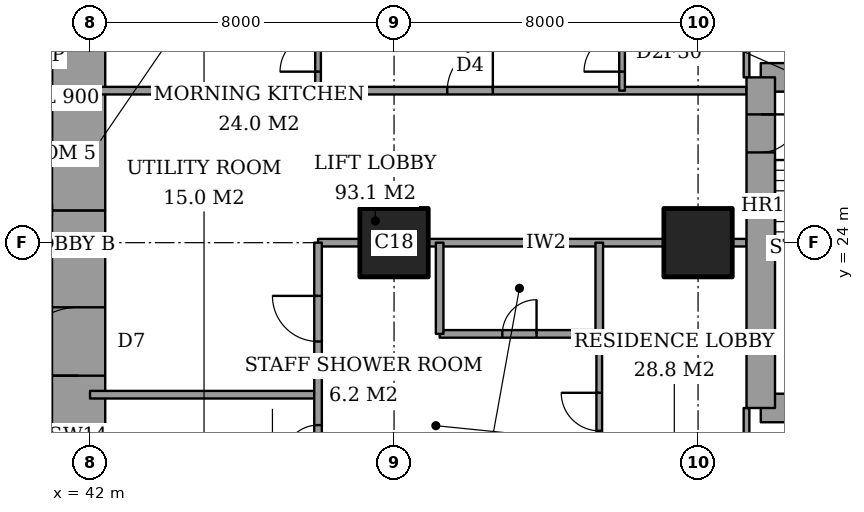
"""IFC4 building model, lengths in metres.
Left out: names, types, materials, properties, quantities, classifications, styles, units other than length and angle.
Written with IfcOpenShell. Run it as: python <this file> out.ifc"""

import sys

from ifc_helpers import new_model, si_unit, direction, frame, frame_2d, origin, origin_2d, place, context, subcontext, project, spatial, rectangle, extrude, element, fill, save


model = new_model("IFC4")
c1 = context("Model", 3, precision=1e-05, world=origin(), true_north=direction((0.0, 1.0)))
c2 = subcontext(c1, "Body", "Model", "MODEL_VIEW")
j1 = project(units=[si_unit("LENGTHUNIT", "METRE"), si_unit("PLANEANGLEUNIT", "RADIAN")], contexts=[c1])
p1 = place(None, origin())
s1 = spatial("IfcSite", under=j1, at=p1, CompositionType="ELEMENT")
p2 = place(p1, origin())
s2 = spatial("IfcBuilding", under=s1, at=p2, CompositionType="ELEMENT")
p3 = place(p2, frame((0.0, 0.0, 214.6)))
s3 = spatial("IfcBuildingStorey", under=s2, at=p3, CompositionType="ELEMENT", Elevation=214.6)
for number, where, z_axis, x_axis in (
    (1, (50.0, 24.0, 0.0), (0.0, 0.0, 1.0), (1.0, 0.0, 0.0)),
    (2, (58.0, 24.0, 0.0), (0.0, 0.0, 1.0), (1.0, 0.0, 0.0)),
):
    element("IfcColumn", number, at=place(p3, frame(where, z_axis=z_axis, x_axis=x_axis)), inside=s3, PredefinedType="COLUMN", context=c2, shape_type="SweptSolid", body=[
        extrude(rectangle(XDim=1.8, YDim=1.8, at=origin_2d()), origin(), (0.0, 0.0, 1.0), 3.6),
    ])
p4 = place(p3, frame((41.7, 13.0, 0.0), z_axis=(0.0, 0.0, 1.0), x_axis=(0.0, 1.0, 0.0)))
e3 = element("IfcWall", 3, at=p4, inside=s3, PredefinedType="SHEAR", context=c2, shape_type="SweptSolid", body=[
    extrude(rectangle(XDim=11.85, YDim=1.4, at=frame_2d((5.925, 0.0))), origin(), (0.0, 0.0, 1.0), 3.6),
])
p5 = place(p4, frame((7.5, 0.0, 0.0)))
e4 = element("IfcOpeningElement", 4, at=p5, cuts=e3, PredefinedType="OPENING", context=c2, shape_type="SweptSolid", body=[
    extrude(rectangle(XDim=1.8, YDim=2.4, at=frame_2d((0.9, 1.2))), frame((0.0, 0.71, 0.0), z_axis=(0.0, -1.0, 0.0), x_axis=(1.0, 0.0, 0.0)), (0.0, 0.0, 1.0), 1.42),
])
p6 = place(p3, frame((41.7, 24.85, 0.0), z_axis=(0.0, 0.0, 1.0), x_axis=(0.0, 1.0, 0.0)))
e5 = element("IfcWall", 5, at=p6, inside=s3, PredefinedType="SHEAR", context=c2, shape_type="SweptSolid", body=[
    extrude(rectangle(XDim=10.15, YDim=1.4, at=frame_2d((5.075, 0.0))), origin(), (0.0, 0.0, 1.0), 3.6),
])
for number, where, z_axis, x_axis in (
    (6, (59.65, 19.65, 0.0), (0.0, 0.0, 1.0), (1.0, 0.0, 0.0)),
    (7, (64.1, 28.35, 0.0), (0.0, 0.0, 1.0), (-1.0, 0.0, 0.0)),
):
    element("IfcWall", number, at=place(p3, frame(where, z_axis=z_axis, x_axis=x_axis)), inside=s3, PredefinedType="SHEAR", context=c2, shape_type="SweptSolid", body=[
        extrude(rectangle(XDim=4.45, YDim=0.75, at=frame_2d((2.225, 0.0))), origin(), (0.0, 0.0, 1.0), 3.6),
    ])
p7 = place(p3, frame((59.65, 28.35, 0.0), z_axis=(0.0, 0.0, 1.0), x_axis=(0.0, -1.0, 0.0)))
e8 = element("IfcWall", 8, at=p7, inside=s3, PredefinedType="SHEAR", context=c2, shape_type="SweptSolid", body=[
    extrude(rectangle(XDim=8.7, YDim=0.75, at=frame_2d((4.35, 0.0))), origin(), (0.0, 0.0, 1.0), 3.6),
])
p8 = place(p7, frame((0.975, 0.0, 0.0)))
e9 = element("IfcOpeningElement", 9, at=p8, cuts=e8, PredefinedType="OPENING", context=c2, shape_type="SweptSolid", body=[
    extrude(rectangle(XDim=1.0, YDim=2.1, at=frame_2d((0.5, 1.05))), frame((0.0, 0.385, 0.0), z_axis=(0.0, -1.0, 0.0), x_axis=(1.0, 0.0, 0.0)), (0.0, 0.0, 1.0), 0.77),
])
p9 = place(p3, frame((42.0, 20.0, 0.0), z_axis=(0.0, 0.0, 1.0), x_axis=(1.0, 0.0, 0.0)))
e10 = element("IfcWall", 10, at=p9, inside=s3, PredefinedType="PARTITIONING", context=c2, shape_type="SweptSolid", body=[
    extrude(rectangle(XDim=6.0, YDim=0.2, at=frame_2d((3.0, 0.0))), origin(), (0.0, 0.0, 1.0), 3.35),
])
p10 = place(p3, frame((51.2, 21.6, 0.0), z_axis=(0.0, 0.0, 1.0), x_axis=(1.0, 0.0, 0.0)))
e11 = element("IfcWall", 11, at=p10, inside=s3, PredefinedType="PARTITIONING", context=c2, shape_type="SweptSolid", body=[
    extrude(rectangle(XDim=4.2, YDim=0.2, at=frame_2d((2.1, 0.0))), origin(), (0.0, 0.0, 1.0), 3.35),
])
p11 = place(p10, frame((1.65, 0.0, 0.0)))
e12 = element("IfcOpeningElement", 12, at=p11, cuts=e11, PredefinedType="OPENING", context=c2, shape_type="SweptSolid", body=[
    extrude(rectangle(XDim=0.9, YDim=2.1, at=frame_2d((0.45, 1.05))), frame((0.0, 0.11, 0.0), z_axis=(0.0, -1.0, 0.0), x_axis=(1.0, 0.0, 0.0)), (0.0, 0.0, 1.0), 0.22),
])
p12 = place(p3, frame((48.0, 24.0, 0.0), z_axis=(0.0, 0.0, 1.0), x_axis=(1.0, 0.0, 0.0)))
e13 = element("IfcWall", 13, at=p12, inside=s3, PredefinedType="PARTITIONING", context=c2, shape_type="SweptSolid", body=[
    extrude(rectangle(XDim=1.1, YDim=0.2, at=frame_2d((0.55, 0.0))), origin(), (0.0, 0.0, 1.0), 3.35),
])
p13 = place(p3, frame((50.9, 24.0, 0.0), z_axis=(0.0, 0.0, 1.0), x_axis=(1.0, 0.0, 0.0)))
e14 = element("IfcWall", 14, at=p13, inside=s3, PredefinedType="PARTITIONING", context=c2, shape_type="SweptSolid", body=[
    extrude(rectangle(XDim=6.2, YDim=0.2, at=frame_2d((3.1, 0.0))), origin(), (0.0, 0.0, 1.0), 3.35),
])
p14 = place(p3, frame((58.9, 24.0, 0.0), z_axis=(0.0, 0.0, 1.0), x_axis=(1.0, 0.0, 0.0)))
e15 = element("IfcWall", 15, at=p14, inside=s3, PredefinedType="PARTITIONING", context=c2, shape_type="SweptSolid", body=[
    extrude(rectangle(XDim=0.375, YDim=0.2, at=frame_2d((0.188, 0.0))), origin(), (0.0, 0.0, 1.0), 3.35),
])
p15 = place(p3, frame((42.0, 28.0, 0.0), z_axis=(0.0, 0.0, 1.0), x_axis=(1.0, 0.0, 0.0)))
e16 = element("IfcWall", 16, at=p15, inside=s3, PredefinedType="PARTITIONING", context=c2, shape_type="SweptSolid", body=[
    extrude(rectangle(XDim=17.275, YDim=0.2, at=frame_2d((8.637, 0.0))), origin(), (0.0, 0.0, 1.0), 3.35),
])
p16 = place(p15, frame((9.4, 0.0, 0.0)))
e17 = element("IfcOpeningElement", 17, at=p16, cuts=e16, PredefinedType="OPENING", context=c2, shape_type="SweptSolid", body=[
    extrude(rectangle(XDim=1.2, YDim=2.4, at=frame_2d((0.6, 1.2))), frame((0.0, 0.11, 0.0), z_axis=(0.0, -1.0, 0.0), x_axis=(1.0, 0.0, 0.0)), (0.0, 0.0, 1.0), 0.22),
])
p17 = place(p3, frame((48.0, 17.5, 0.0), z_axis=(0.0, 0.0, 1.0), x_axis=(0.0, 1.0, 0.0)))
e18 = element("IfcWall", 18, at=p17, inside=s3, PredefinedType="PARTITIONING", context=c2, shape_type="SweptSolid", body=[
    extrude(rectangle(XDim=6.5, YDim=0.2, at=frame_2d((3.25, 0.0))), origin(), (0.0, 0.0, 1.0), 3.35),
])
p18 = place(p17, frame((3.9, 0.0, 0.0)))
e19 = element("IfcOpeningElement", 19, at=p18, cuts=e18, PredefinedType="OPENING", context=c2, shape_type="SweptSolid", body=[
    extrude(rectangle(XDim=1.2, YDim=2.4, at=frame_2d((0.6, 1.2))), frame((0.0, 0.11, 0.0), z_axis=(0.0, -1.0, 0.0), x_axis=(1.0, 0.0, 0.0)), (0.0, 0.0, 1.0), 0.22),
])
p19 = place(p17, frame((0.8, 0.0, 0.0)))
e20 = element("IfcOpeningElement", 20, at=p19, cuts=e18, PredefinedType="OPENING", context=c2, shape_type="SweptSolid", body=[
    extrude(rectangle(XDim=0.9, YDim=2.1, at=frame_2d((0.45, 1.05))), frame((0.0, 0.11, 0.0), z_axis=(0.0, -1.0, 0.0), x_axis=(1.0, 0.0, 0.0)), (0.0, 0.0, 1.0), 0.22),
])
p20 = place(p3, frame((48.0, 28.0, 0.0), z_axis=(0.0, 0.0, 1.0), x_axis=(0.0, 1.0, 0.0)))
e21 = element("IfcWall", 21, at=p20, inside=s3, PredefinedType="PARTITIONING", context=c2, shape_type="SweptSolid", body=[
    extrude(rectangle(XDim=9.4, YDim=0.15, at=frame_2d((4.7, 0.0))), origin(), (0.0, 0.0, 1.0), 3.35),
])
p21 = place(p20, frame((0.5, 0.0, 0.0)))
e22 = element("IfcOpeningElement", 22, at=p21, cuts=e21, PredefinedType="OPENING", context=c2, shape_type="SweptSolid", body=[
    extrude(rectangle(XDim=1.0, YDim=2.1, at=frame_2d((0.5, 1.05))), frame((0.0, 0.085, 0.0), z_axis=(0.0, -1.0, 0.0), x_axis=(1.0, 0.0, 0.0)), (0.0, 0.0, 1.0), 0.17),
])
for number, where, z_axis, x_axis in (
    (23, (51.2, 21.6, 0.0), (0.0, 0.0, 1.0), (0.0, 1.0, 0.0)),
    (24, (55.4, 21.6, 0.0), (0.0, 0.0, 1.0), (0.0, 1.0, 0.0)),
):
    element("IfcWall", number, at=place(p3, frame(where, z_axis=z_axis, x_axis=x_axis)), inside=s3, PredefinedType="PARTITIONING", context=c2, shape_type="SweptSolid", body=[
        extrude(rectangle(XDim=2.4, YDim=0.2, at=frame_2d((1.2, 0.0))), origin(), (0.0, 0.0, 1.0), 3.35),
    ])
p22 = place(p3, frame((55.4, 11.0, 0.0), z_axis=(0.0, 0.0, 1.0), x_axis=(0.0, 1.0, 0.0)))
e25 = element("IfcWall", 25, at=p22, inside=s3, PredefinedType="PARTITIONING", context=c2, shape_type="SweptSolid", body=[
    extrude(rectangle(XDim=10.6, YDim=0.15, at=frame_2d((5.3, 0.0))), origin(), (0.0, 0.0, 1.0), 3.35),
])
p23 = place(p22, frame((8.05, 0.0, 0.0)))
e26 = element("IfcOpeningElement", 26, at=p23, cuts=e25, PredefinedType="OPENING", context=c2, shape_type="SweptSolid", body=[
    extrude(rectangle(XDim=1.0, YDim=2.1, at=frame_2d((0.5, 1.05))), frame((0.0, 0.085, 0.0), z_axis=(0.0, -1.0, 0.0), x_axis=(1.0, 0.0, 0.0)), (0.0, 0.0, 1.0), 0.17),
])
p24 = place(p3, frame((56.0, 28.0, 0.0), z_axis=(0.0, 0.0, 1.0), x_axis=(0.0, 1.0, 0.0)))
e27 = element("IfcWall", 27, at=p24, inside=s3, PredefinedType="PARTITIONING", context=c2, shape_type="SweptSolid", body=[
    extrude(rectangle(XDim=9.4, YDim=0.15, at=frame_2d((4.7, 0.0))), origin(), (0.0, 0.0, 1.0), 3.35),
])
p25 = place(p24, frame((0.5, 0.0, 0.0)))
e28 = element("IfcOpeningElement", 28, at=p25, cuts=e27, PredefinedType="OPENING", context=c2, shape_type="SweptSolid", body=[
    extrude(rectangle(XDim=1.0, YDim=2.1, at=frame_2d((0.5, 1.05))), frame((0.0, 0.085, 0.0), z_axis=(0.0, -1.0, 0.0), x_axis=(1.0, 0.0, 0.0)), (0.0, 0.0, 1.0), 0.17),
])
p26 = place(p3, frame((59.275, 17.2, 0.0), z_axis=(0.0, 0.0, 1.0), x_axis=(0.0, 1.0, 0.0)))
e29 = element("IfcWall", 29, at=p26, inside=s3, PredefinedType="PARTITIONING", context=c2, shape_type="SweptSolid", body=[
    extrude(rectangle(XDim=2.45, YDim=0.15, at=frame_2d((1.225, 0.0))), origin(), (0.0, 0.0, 1.0), 3.35),
])
p27 = place(p26, frame((0.587, 0.0, 0.0)))
e30 = element("IfcOpeningElement", 30, at=p27, cuts=e29, PredefinedType="OPENING", context=c2, shape_type="SweptSolid", body=[
    extrude(rectangle(XDim=0.9, YDim=2.1, at=frame_2d((0.45, 1.05))), frame((0.0, 0.085, 0.0), z_axis=(0.0, -1.0, 0.0), x_axis=(1.0, 0.0, 0.0)), (0.0, 0.0, 1.0), 0.17),
])
p28 = place(p3, frame((59.275, 28.35, 0.0), z_axis=(0.0, 0.0, 1.0), x_axis=(0.0, 1.0, 0.0)))
e31 = element("IfcWall", 31, at=p28, inside=s3, PredefinedType="PARTITIONING", context=c2, shape_type="SweptSolid", body=[
    extrude(rectangle(XDim=2.45, YDim=0.15, at=frame_2d((1.225, 0.0))), origin(), (0.0, 0.0, 1.0), 3.35),
])
p29 = place(p28, frame((0.962, 0.0, 0.0)))
e32 = element("IfcOpeningElement", 32, at=p29, cuts=e31, PredefinedType="OPENING", context=c2, shape_type="SweptSolid", body=[
    extrude(rectangle(XDim=0.9, YDim=2.1, at=frame_2d((0.45, 1.05))), frame((0.0, 0.085, 0.0), z_axis=(0.0, -1.0, 0.0), x_axis=(1.0, 0.0, 0.0)), (0.0, 0.0, 1.0), 0.17),
])
p30 = place(p23, origin())
e33 = element("IfcDoor", 33, at=p30, inside=s3, OperationType="SINGLE_SWING_LEFT", PredefinedType="DOOR", context=c2, shape_type="SweptSolid", body=[
    extrude(rectangle(XDim=1.0, YDim=2.1, at=frame_2d((0.5, 1.05))), frame((0.0, 0.025, 0.0), z_axis=(0.0, -1.0, 0.0), x_axis=(1.0, 0.0, 0.0)), (0.0, 0.0, 1.0), 0.05),
])
fill(e26, e33)
p31 = place(p11, origin())
e34 = element("IfcDoor", 34, at=p31, inside=s3, OperationType="SINGLE_SWING_LEFT", PredefinedType="DOOR", context=c2, shape_type="SweptSolid", body=[
    extrude(rectangle(XDim=0.9, YDim=2.1, at=frame_2d((0.45, 1.05))), frame((0.0, 0.025, 0.0), z_axis=(0.0, -1.0, 0.0), x_axis=(1.0, 0.0, 0.0)), (0.0, 0.0, 1.0), 0.05),
])
fill(e12, e34)
p32 = place(p18, origin())
e35 = element("IfcDoor", 35, at=p32, inside=s3, OperationType="SINGLE_SWING_LEFT", PredefinedType="DOOR", context=c2, shape_type="SweptSolid", body=[
    extrude(rectangle(XDim=1.2, YDim=2.4, at=frame_2d((0.6, 1.2))), frame((0.0, 0.025, 0.0), z_axis=(0.0, -1.0, 0.0), x_axis=(1.0, 0.0, 0.0)), (0.0, 0.0, 1.0), 0.05),
])
fill(e19, e35)
p33 = place(p19, origin())
e36 = element("IfcDoor", 36, at=p33, inside=s3, OperationType="SINGLE_SWING_RIGHT", PredefinedType="DOOR", context=c2, shape_type="SweptSolid", body=[
    extrude(rectangle(XDim=0.9, YDim=2.1, at=frame_2d((0.45, 1.05))), frame((0.0, 0.025, 0.0), z_axis=(0.0, -1.0, 0.0), x_axis=(1.0, 0.0, 0.0)), (0.0, 0.0, 1.0), 0.05),
])
fill(e20, e36)
p34 = place(p25, origin())
e37 = element("IfcDoor", 37, at=p34, inside=s3, OperationType="SINGLE_SWING_RIGHT", PredefinedType="DOOR", context=c2, shape_type="SweptSolid", body=[
    extrude(rectangle(XDim=1.0, YDim=2.1, at=frame_2d((0.5, 1.05))), frame((0.0, 0.025, 0.0), z_axis=(0.0, -1.0, 0.0), x_axis=(1.0, 0.0, 0.0)), (0.0, 0.0, 1.0), 0.05),
])
fill(e28, e37)
p35 = place(p16, origin())
e38 = element("IfcDoor", 38, at=p35, inside=s3, OperationType="SINGLE_SWING_LEFT", PredefinedType="DOOR", context=c2, shape_type="SweptSolid", body=[
    extrude(rectangle(XDim=1.2, YDim=2.4, at=frame_2d((0.6, 1.2))), frame((0.0, 0.025, 0.0), z_axis=(0.0, -1.0, 0.0), x_axis=(1.0, 0.0, 0.0)), (0.0, 0.0, 1.0), 0.05),
])
fill(e17, e38)
p36 = place(p21, origin())
e39 = element("IfcDoor", 39, at=p36, inside=s3, OperationType="SINGLE_SWING_RIGHT", PredefinedType="DOOR", context=c2, shape_type="SweptSolid", body=[
    extrude(rectangle(XDim=1.0, YDim=2.1, at=frame_2d((0.5, 1.05))), frame((0.0, 0.025, 0.0), z_axis=(0.0, -1.0, 0.0), x_axis=(1.0, 0.0, 0.0)), (0.0, 0.0, 1.0), 0.05),
])
fill(e22, e39)
p37 = place(p5, origin())
e40 = element("IfcDoor", 40, at=p37, inside=s3, OperationType="DOUBLE_DOOR_DOUBLE_SWING", PredefinedType="DOOR", context=c2, shape_type="SweptSolid", body=[
    extrude(rectangle(XDim=1.8, YDim=2.4, at=frame_2d((0.9, 1.2))), frame((0.0, 0.025, 0.0), z_axis=(0.0, -1.0, 0.0), x_axis=(1.0, 0.0, 0.0)), (0.0, 0.0, 1.0), 0.05),
])
fill(e4, e40)
p38 = place(p8, origin())
e41 = element("IfcDoor", 41, at=p38, inside=s3, OperationType="SINGLE_SWING_RIGHT", PredefinedType="DOOR", context=c2, shape_type="SweptSolid", body=[
    extrude(rectangle(XDim=1.0, YDim=2.1, at=frame_2d((0.5, 1.05))), frame((0.0, 0.025, 0.0), z_axis=(0.0, -1.0, 0.0), x_axis=(1.0, 0.0, 0.0)), (0.0, 0.0, 1.0), 0.05),
])
fill(e9, e41)
save(model, sys.argv[1])
